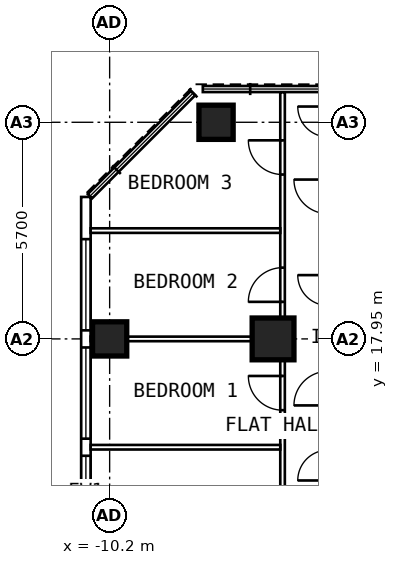
"""IFC4 building model, lengths in metres.
Left out: names, types, materials, properties, quantities, classifications, styles, units other than length and angle.
Written with IfcOpenShell. Run it as: python <this file> out.ifc"""

import sys

from ifc_helpers import new_model, si_unit, direction, frame, frame_2d, origin, origin_2d, place, context, subcontext, project, spatial, rectangle, extrude, element, fill, save


model = new_model("IFC4")
c1 = context("Model", 3, precision=1e-05, world=origin(), true_north=direction((0.0, 1.0)))
c2 = subcontext(c1, "Body", "Model", "MODEL_VIEW")
j1 = project(units=[si_unit("LENGTHUNIT", "METRE"), si_unit("PLANEANGLEUNIT", "RADIAN")], contexts=[c1])
p1 = place(None, origin())
s1 = spatial("IfcSite", under=j1, at=p1, CompositionType="ELEMENT")
p2 = place(p1, origin())
s2 = spatial("IfcBuilding", under=s1, at=p2, CompositionType="ELEMENT")
p3 = place(p2, frame((0.0, 0.0, 204.6)))
s3 = spatial("IfcBuildingStorey", under=s2, at=p3, CompositionType="ELEMENT", Elevation=204.6)
for number, where, z_axis, x_axis in (
    (1, (-10.2, 17.95, 0.0), (0.0, 0.0, 1.0), (0.0, 1.0, 0.0)),
    (2, (-7.4, 23.65, 0.0), (0.0, 0.0, 1.0), (0.0, 1.0, 0.0)),
):
    element("IfcColumn", number, at=place(p3, frame(where, z_axis=z_axis, x_axis=x_axis)), inside=s3, PredefinedType="COLUMN", context=c2, shape_type="SweptSolid", body=[
        extrude(rectangle(XDim=0.9, YDim=0.9, at=origin_2d()), origin(), (0.0, 0.0, 1.0), 3.6),
    ])
p4 = place(p3, frame((-5.9, 17.95, 0.0), z_axis=(0.0, 0.0, 1.0), x_axis=(0.0, 1.0, 0.0)))
e3 = element("IfcColumn", 3, at=p4, inside=s3, PredefinedType="COLUMN", context=c2, shape_type="SweptSolid", body=[
    extrude(rectangle(XDim=1.1, YDim=1.1, at=origin_2d()), origin(), (0.0, 0.0, 1.0), 3.6),
])
p5 = place(p3, frame((-10.825, 6.148, 0.0), z_axis=(0.0, 0.0, 1.0), x_axis=(0.0, 1.0, 0.0)))
e4 = element("IfcWall", 4, at=p5, inside=s3, PredefinedType="SOLIDWALL", context=c2, shape_type="SweptSolid", body=[
    extrude(rectangle(XDim=15.537, YDim=0.25, at=frame_2d((7.769, 0.0))), origin(), (0.0, 0.0, 1.0), 3.35),
])
p6 = place(p5, frame((0.627, 0.0, 0.8)))
e5 = element("IfcOpeningElement", 5, at=p6, cuts=e4, PredefinedType="OPENING", context=c2, shape_type="SweptSolid", body=[
    extrude(rectangle(XDim=2.4, YDim=1.8, at=frame_2d((1.2, 0.9))), frame((0.0, 0.137, 0.0), z_axis=(0.0, -1.0, 0.0), x_axis=(1.0, 0.0, 0.0)), (0.0, 0.0, 1.0), 0.274),
])
p7 = place(p5, frame((3.477, 0.0, 0.8)))
e6 = element("IfcOpeningElement", 6, at=p7, cuts=e4, PredefinedType="OPENING", context=c2, shape_type="SweptSolid", body=[
    extrude(rectangle(XDim=2.4, YDim=1.8, at=frame_2d((1.2, 0.9))), frame((0.0, 0.137, 0.0), z_axis=(0.0, -1.0, 0.0), x_axis=(1.0, 0.0, 0.0)), (0.0, 0.0, 1.0), 0.274),
])
p8 = place(p5, frame((6.327, 0.0, 0.8)))
e7 = element("IfcOpeningElement", 7, at=p8, cuts=e4, PredefinedType="OPENING", context=c2, shape_type="SweptSolid", body=[
    extrude(rectangle(XDim=2.4, YDim=1.8, at=frame_2d((1.2, 0.9))), frame((0.0, 0.137, 0.0), z_axis=(0.0, -1.0, 0.0), x_axis=(1.0, 0.0, 0.0)), (0.0, 0.0, 1.0), 0.274),
])
p9 = place(p5, frame((9.177, 0.0, 0.8)))
e8 = element("IfcOpeningElement", 8, at=p9, cuts=e4, PredefinedType="OPENING", context=c2, shape_type="SweptSolid", body=[
    extrude(rectangle(XDim=2.4, YDim=1.8, at=frame_2d((1.2, 0.9))), frame((0.0, 0.137, 0.0), z_axis=(0.0, -1.0, 0.0), x_axis=(1.0, 0.0, 0.0)), (0.0, 0.0, 1.0), 0.274),
])
p10 = place(p5, frame((12.027, 0.0, 0.8)))
e9 = element("IfcOpeningElement", 9, at=p10, cuts=e4, PredefinedType="OPENING", context=c2, shape_type="SweptSolid", body=[
    extrude(rectangle(XDim=2.4, YDim=1.8, at=frame_2d((1.2, 0.9))), frame((0.0, 0.137, 0.0), z_axis=(0.0, -1.0, 0.0), x_axis=(1.0, 0.0, 0.0)), (0.0, 0.0, 1.0), 0.274),
])
p11 = place(p3, frame((-5.65, 9.6, 0.0), z_axis=(0.0, 0.0, 1.0), x_axis=(0.0, 1.0, 0.0)))
e10 = element("IfcWall", 10, at=p11, inside=s3, PredefinedType="PARTITIONING", context=c2, shape_type="SweptSolid", body=[
    extrude(rectangle(XDim=14.845, YDim=0.12, at=frame_2d((7.422, 0.0))), origin(), (0.0, 0.0, 1.0), 3.35),
])
p12 = place(p11, frame((3.35, 0.0, 0.0)))
e11 = element("IfcOpeningElement", 11, at=p12, cuts=e10, PredefinedType="OPENING", context=c2, shape_type="SweptSolid", body=[
    extrude(rectangle(XDim=0.9, YDim=2.1, at=frame_2d((0.45, 1.05))), frame((0.0, 0.072, 0.0), z_axis=(0.0, -1.0, 0.0), x_axis=(1.0, 0.0, 0.0)), (0.0, 0.0, 1.0), 0.144),
])
p13 = place(p11, frame((6.475, 0.0, 0.0)))
e12 = element("IfcOpeningElement", 12, at=p13, cuts=e10, PredefinedType="OPENING", context=c2, shape_type="SweptSolid", body=[
    extrude(rectangle(XDim=0.9, YDim=2.1, at=frame_2d((0.45, 1.05))), frame((0.0, 0.072, 0.0), z_axis=(0.0, -1.0, 0.0), x_axis=(1.0, 0.0, 0.0)), (0.0, 0.0, 1.0), 0.144),
])
p14 = place(p11, frame((9.325, 0.0, 0.0)))
e13 = element("IfcOpeningElement", 13, at=p14, cuts=e10, PredefinedType="OPENING", context=c2, shape_type="SweptSolid", body=[
    extrude(rectangle(XDim=0.9, YDim=2.1, at=frame_2d((0.45, 1.05))), frame((0.0, 0.072, 0.0), z_axis=(0.0, -1.0, 0.0), x_axis=(1.0, 0.0, 0.0)), (0.0, 0.0, 1.0), 0.144),
])
p15 = place(p11, frame((12.675, 0.0, 0.0)))
e14 = element("IfcOpeningElement", 14, at=p15, cuts=e10, PredefinedType="OPENING", context=c2, shape_type="SweptSolid", body=[
    extrude(rectangle(XDim=0.9, YDim=2.1, at=frame_2d((0.45, 1.05))), frame((0.0, 0.072, 0.0), z_axis=(0.0, -1.0, 0.0), x_axis=(1.0, 0.0, 0.0)), (0.0, 0.0, 1.0), 0.144),
])
p16 = place(p3, frame((-5.71, 15.1, 0.0), z_axis=(0.0, 0.0, 1.0), x_axis=(-1.0, 0.0, 0.0)))
e15 = element("IfcWall", 15, at=p16, inside=s3, PredefinedType="PARTITIONING", context=c2, shape_type="SweptSolid", body=[
    extrude(rectangle(XDim=4.99, YDim=0.12, at=frame_2d((2.495, 0.0))), origin(), (0.0, 0.0, 1.0), 3.35),
])
p17 = place(p3, frame((-5.71, 17.95, 0.0), z_axis=(0.0, 0.0, 1.0), x_axis=(-1.0, 0.0, 0.0)))
e16 = element("IfcWall", 16, at=p17, inside=s3, PredefinedType="PARTITIONING", context=c2, shape_type="SweptSolid", body=[
    extrude(rectangle(XDim=4.99, YDim=0.12, at=frame_2d((2.495, 0.0))), origin(), (0.0, 0.0, 1.0), 2.45),
])
p18 = place(p3, frame((-5.71, 20.8, 0.0), z_axis=(0.0, 0.0, 1.0), x_axis=(-1.0, 0.0, 0.0)))
e17 = element("IfcWall", 17, at=p18, inside=s3, PredefinedType="PARTITIONING", context=c2, shape_type="SweptSolid", body=[
    extrude(rectangle(XDim=4.99, YDim=0.12, at=frame_2d((2.495, 0.0))), origin(), (0.0, 0.0, 1.0), 3.35),
])
p19 = place(p8, origin())
e18 = element("IfcWindow", 18, at=p19, inside=s3, PartitioningType="SINGLE_PANEL", PredefinedType="WINDOW", context=c2, shape_type="SweptSolid", body=[
    extrude(rectangle(XDim=2.4, YDim=1.8, at=frame_2d((1.2, 0.9))), frame((0.0, 0.03, 0.0), z_axis=(0.0, -1.0, 0.0), x_axis=(1.0, 0.0, 0.0)), (0.0, 0.0, 1.0), 0.06),
])
fill(e7, e18)
p20 = place(p9, origin())
e19 = element("IfcWindow", 19, at=p20, inside=s3, PartitioningType="SINGLE_PANEL", PredefinedType="WINDOW", context=c2, shape_type="SweptSolid", body=[
    extrude(rectangle(XDim=2.4, YDim=1.8, at=frame_2d((1.2, 0.9))), frame((0.0, 0.03, 0.0), z_axis=(0.0, -1.0, 0.0), x_axis=(1.0, 0.0, 0.0)), (0.0, 0.0, 1.0), 0.06),
])
fill(e8, e19)
p21 = place(p10, origin())
e20 = element("IfcWindow", 20, at=p21, inside=s3, PartitioningType="SINGLE_PANEL", PredefinedType="WINDOW", context=c2, shape_type="SweptSolid", body=[
    extrude(rectangle(XDim=2.4, YDim=1.8, at=frame_2d((1.2, 0.9))), frame((0.0, 0.03, 0.0), z_axis=(0.0, -1.0, 0.0), x_axis=(1.0, 0.0, 0.0)), (0.0, 0.0, 1.0), 0.06),
])
fill(e9, e20)
p22 = place(p13, origin())
e21 = element("IfcDoor", 21, at=p22, inside=s3, OperationType="SINGLE_SWING_RIGHT", PredefinedType="DOOR", context=c2, shape_type="SweptSolid", body=[
    extrude(rectangle(XDim=0.9, YDim=2.1, at=frame_2d((0.45, 1.05))), frame((0.0, 0.025, 0.0), z_axis=(0.0, -1.0, 0.0), x_axis=(1.0, 0.0, 0.0)), (0.0, 0.0, 1.0), 0.05),
])
fill(e12, e21)
p23 = place(p14, origin())
e22 = element("IfcDoor", 22, at=p23, inside=s3, OperationType="SINGLE_SWING_LEFT", PredefinedType="DOOR", context=c2, shape_type="SweptSolid", body=[
    extrude(rectangle(XDim=0.9, YDim=2.1, at=frame_2d((0.45, 1.05))), frame((0.0, 0.025, 0.0), z_axis=(0.0, -1.0, 0.0), x_axis=(1.0, 0.0, 0.0)), (0.0, 0.0, 1.0), 0.05),
])
fill(e13, e22)
p24 = place(p15, origin())
e23 = element("IfcDoor", 23, at=p24, inside=s3, OperationType="SINGLE_SWING_RIGHT", PredefinedType="DOOR", context=c2, shape_type="SweptSolid", body=[
    extrude(rectangle(XDim=0.9, YDim=2.1, at=frame_2d((0.45, 1.05))), frame((0.0, 0.025, 0.0), z_axis=(0.0, -1.0, 0.0), x_axis=(1.0, 0.0, 0.0)), (0.0, 0.0, 1.0), 0.05),
])
fill(e14, e23)
save(model, sys.argv[1])
